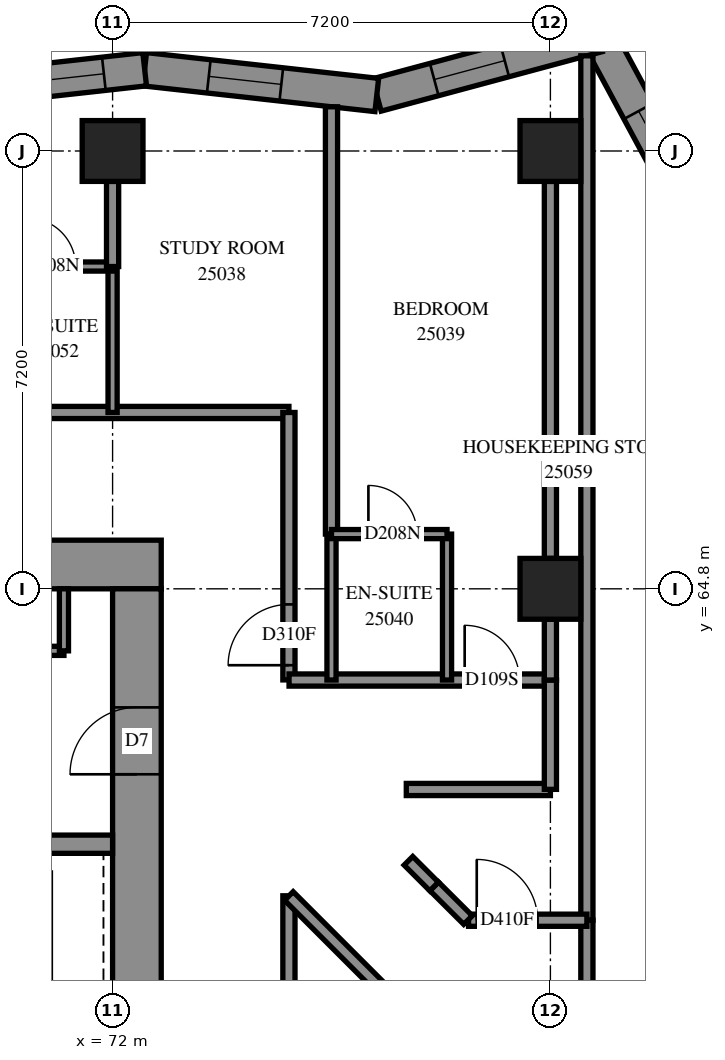
"""IFC4 building model, lengths in metres.
Left out: names, types, materials, properties, quantities, classifications, styles, units other than length and angle.
Written with IfcOpenShell. Run it as: python <this file> out.ifc"""

import sys

from ifc_helpers import new_model, si_unit, direction, frame, frame_2d, origin, origin_2d, place, context, subcontext, project, spatial, polyline, rectangle, outline, extrude, element, fill, save


model = new_model("IFC4")
c1 = context("Model", 3, precision=1e-05, world=origin(), true_north=direction((0.0, 1.0)))
c2 = subcontext(c1, "Body", "Model", "MODEL_VIEW")
j1 = project(units=[si_unit("LENGTHUNIT", "METRE"), si_unit("PLANEANGLEUNIT", "RADIAN")], contexts=[c1])
p1 = place(None, origin())
s1 = spatial("IfcSite", under=j1, at=p1, CompositionType="ELEMENT")
p2 = place(p1, origin())
s2 = spatial("IfcBuilding", under=s1, at=p2, CompositionType="ELEMENT")
p3 = place(p2, frame((0.0, 0.0, 94.8)))
s3 = spatial("IfcBuildingStorey", under=s2, at=p3, CompositionType="ELEMENT", Elevation=94.8)
for number, where, z_axis, x_axis in (
    (1, (72.0, 72.0, 0.0), (0.0, 0.0, 1.0), (1.0, 0.0, 0.0)),
    (2, (79.2, 64.8, 0.0), (0.0, 0.0, 1.0), (1.0, 0.0, 0.0)),
    (3, (79.2, 72.0, 0.0), (0.0, 0.0, 1.0), (1.0, 0.0, 0.0)),
):
    element("IfcColumn", number, at=place(p3, frame(where, z_axis=z_axis, x_axis=x_axis)), inside=s3, PredefinedType="COLUMN", context=c2, shape_type="SweptSolid", body=[
        extrude(rectangle(XDim=1.0, YDim=1.0, at=origin_2d()), origin(), (0.0, 0.0, 1.0), 3.1),
    ])
p4 = place(p3, frame((56.8, 65.2, -0.3), z_axis=(0.0, 0.0, 1.0), x_axis=(1.0, 0.0, 0.0)))
e4 = element("IfcWall", 4, at=p4, inside=s3, PredefinedType="SHEAR", context=c2, shape_type="SweptSolid", body=[
    extrude(rectangle(XDim=16.0, YDim=0.8, at=frame_2d((8.0, 0.0))), origin(), (0.0, 0.0, 1.0), 2.7),
])
p5 = place(p4, frame((10.8, 0.0, 0.3)))
e5 = element("IfcOpeningElement", 5, at=p5, cuts=e4, PredefinedType="OPENING", context=c2, shape_type="SweptSolid", body=[
    extrude(rectangle(XDim=0.8, YDim=2.1, at=frame_2d((0.4, 1.05))), frame((0.0, 0.41, 0.0), z_axis=(0.0, -1.0, 0.0), x_axis=(1.0, 0.0, 0.0)), (0.0, 0.0, 1.0), 0.82),
])
p6 = place(p3, frame((72.4, 50.4, -0.3), z_axis=(0.0, 0.0, 1.0), x_axis=(0.0, 1.0, 0.0)))
e6 = element("IfcWall", 6, at=p6, inside=s3, PredefinedType="SHEAR", context=c2, shape_type="SweptSolid", body=[
    extrude(rectangle(XDim=14.4, YDim=0.8, at=frame_2d((7.2, 0.0))), origin(), (0.0, 0.0, 1.0), 2.7),
])
p7 = place(p6, frame((4.55, 0.0, 0.3)))
e7 = element("IfcOpeningElement", 7, at=p7, cuts=e6, PredefinedType="OPENING", context=c2, shape_type="SweptSolid", body=[
    extrude(rectangle(XDim=1.1, YDim=2.1, at=frame_2d((0.55, 1.05))), frame((0.0, 0.41, 0.0), z_axis=(0.0, -1.0, 0.0), x_axis=(1.0, 0.0, 0.0)), (0.0, 0.0, 1.0), 0.82),
])
p8 = place(p6, frame((11.35, 0.0, 0.3)))
e8 = element("IfcOpeningElement", 8, at=p8, cuts=e6, PredefinedType="OPENING", context=c2, shape_type="SweptSolid", body=[
    extrude(rectangle(XDim=1.1, YDim=2.1, at=frame_2d((0.55, 1.05))), frame((0.0, 0.41, 0.0), z_axis=(0.0, -1.0, 0.0), x_axis=(1.0, 0.0, 0.0)), (0.0, 0.0, 1.0), 0.82),
])
p9 = place(p3, frame((64.8, 60.6, 0.0), z_axis=(0.0, 0.0, 1.0), x_axis=(1.0, 0.0, 0.0)))
e9 = element("IfcWall", 9, at=p9, inside=s3, PredefinedType="SOLIDWALL", context=c2, shape_type="SweptSolid", body=[
    extrude(rectangle(XDim=7.2, YDim=0.3, at=frame_2d((3.6, 0.0))), origin(), (0.0, 0.0, 1.0), 3.1),
])
p10 = place(p3, frame((76.372, 49.373, -0.3), z_axis=(0.0, 0.0, 1.0), x_axis=(0.7071067812, 0.7071067812, 0.0)))
e10 = element("IfcWall", 10, at=p10, inside=s3, PredefinedType="SHEAR", context=c2, shape_type="SweptSolid", body=[
    extrude(rectangle(XDim=14.4, YDim=0.8, at=frame_2d((7.2, 0.0))), origin(), (0.0, 0.0, 1.0), 2.7),
])
p11 = place(p10, frame((4.55, 0.0, 0.3)))
e11 = element("IfcOpeningElement", 11, at=p11, cuts=e10, PredefinedType="OPENING", context=c2, shape_type="SweptSolid", body=[
    extrude(rectangle(XDim=1.1, YDim=2.1, at=frame_2d((0.55, 1.05))), frame((0.0, 0.41, 0.0), z_axis=(0.0, -1.0, 0.0), x_axis=(1.0, 0.0, 0.0)), (0.0, 0.0, 1.0), 0.82),
])
p12 = place(p10, frame((11.35, 0.0, 0.3)))
e12 = element("IfcOpeningElement", 12, at=p12, cuts=e10, PredefinedType="OPENING", context=c2, shape_type="SweptSolid", body=[
    extrude(rectangle(XDim=1.1, YDim=2.1, at=frame_2d((0.55, 1.05))), frame((0.0, 0.41, 0.0), z_axis=(0.0, -1.0, 0.0), x_axis=(1.0, 0.0, 0.0)), (0.0, 0.0, 1.0), 0.82),
])
p13 = place(p3, frame((81.594, 70.907, 0.0), z_axis=(0.0, 0.0, 1.0), x_axis=(-0.4744753072, 0.8802688129, 0.0)))
e13 = element("IfcWall", 13, at=p13, inside=s3, PredefinedType="SOLIDWALL", context=c2, shape_type="SweptSolid", body=[
    extrude(outline(polyline([(0.058, -0.275), (3.616, -0.275), (3.181, 0.275), (-0.058, 0.275), (0.058, -0.275)])), origin(), (0.0, 0.0, 1.0), 3.1),
])
p14 = place(p13, frame((0.787, 0.0, 0.5)))
e14 = element("IfcOpeningElement", 14, at=p14, cuts=e13, PredefinedType="OPENING", context=c2, shape_type="SweptSolid", body=[
    extrude(rectangle(XDim=1.2, YDim=2.45, at=frame_2d((0.6, 1.225))), frame((0.0, 0.285, 0.0), z_axis=(0.0, -1.0, 0.0), x_axis=(1.0, 0.0, 0.0)), (0.0, 0.0, 1.0), 0.57),
])
p15 = place(p3, frame((79.981, 73.899, 0.0), z_axis=(0.0, 0.0, 1.0), x_axis=(-0.9656875188, -0.2597067886, 0.0)))
e15 = element("IfcWall", 15, at=p15, inside=s3, PredefinedType="SOLIDWALL", context=c2, shape_type="SweptSolid", body=[
    extrude(outline(polyline([(-0.218, -0.275), (3.713, -0.275), (3.817, 0.275), (0.218, 0.275), (-0.218, -0.275)])), origin(), (0.0, 0.0, 1.0), 3.1),
])
p16 = place(p15, frame((1.587, 0.0, 0.5)))
e16 = element("IfcOpeningElement", 16, at=p16, cuts=e15, PredefinedType="OPENING", context=c2, shape_type="SweptSolid", body=[
    extrude(rectangle(XDim=1.2, YDim=2.45, at=frame_2d((0.6, 1.225))), frame((0.0, 0.285, 0.0), z_axis=(0.0, -1.0, 0.0), x_axis=(1.0, 0.0, 0.0)), (0.0, 0.0, 1.0), 0.57),
])
p17 = place(p3, frame((76.345, 72.921, 0.0), z_axis=(0.0, 0.0, 1.0), x_axis=(-0.9939087915, 0.1102057815, 0.0)))
e17 = element("IfcWall", 17, at=p17, inside=s3, PredefinedType="SOLIDWALL", context=c2, shape_type="SweptSolid", body=[
    extrude(outline(polyline([(0.052, -0.275), (3.872, -0.275), (3.811, 0.275), (-0.052, 0.275), (0.052, -0.275)])), origin(), (0.0, 0.0, 1.0), 3.1),
])
p18 = place(p17, frame((1.58, 0.0, 0.5)))
e18 = element("IfcOpeningElement", 18, at=p18, cuts=e17, PredefinedType="OPENING", context=c2, shape_type="SweptSolid", body=[
    extrude(rectangle(XDim=1.2, YDim=2.45, at=frame_2d((0.6, 1.225))), frame((0.0, 0.285, 0.0), z_axis=(0.0, -1.0, 0.0), x_axis=(1.0, 0.0, 0.0)), (0.0, 0.0, 1.0), 0.57),
])
p19 = place(p3, frame((72.527, 73.344, 0.0), z_axis=(0.0, 0.0, 1.0), x_axis=(-0.99390702, -0.1102217568, 0.0)))
e19 = element("IfcWall", 19, at=p19, inside=s3, PredefinedType="SOLIDWALL", context=c2, shape_type="SweptSolid", body=[
    extrude(outline(polyline([(-0.03, -0.275), (3.789, -0.275), (3.85, 0.275), (0.03, 0.275), (-0.03, -0.275)])), origin(), (0.0, 0.0, 1.0), 3.1),
])
p20 = place(p19, frame((0.675, 0.0, 0.5)))
e20 = element("IfcOpeningElement", 20, at=p20, cuts=e19, PredefinedType="OPENING", context=c2, shape_type="SweptSolid", body=[
    extrude(rectangle(XDim=1.3, YDim=2.45, at=frame_2d((0.65, 1.225))), frame((0.0, 0.285, 0.0), z_axis=(0.0, -1.0, 0.0), x_axis=(1.0, 0.0, 0.0)), (0.0, 0.0, 1.0), 0.57),
])
p21 = place(p19, frame((2.175, 0.0, 0.5)))
e21 = element("IfcOpeningElement", 21, at=p21, cuts=e19, PredefinedType="OPENING", context=c2, shape_type="SweptSolid", body=[
    extrude(rectangle(XDim=1.3, YDim=2.45, at=frame_2d((0.65, 1.225))), frame((0.0, 0.285, 0.0), z_axis=(0.0, -1.0, 0.0), x_axis=(1.0, 0.0, 0.0)), (0.0, 0.0, 1.0), 0.57),
])
p22 = place(p3, frame((64.95, 63.78, 0.0), z_axis=(0.0, 0.0, 1.0), x_axis=(1.0, 0.0, 0.0)))
e22 = element("IfcWall", 22, at=p22, inside=s3, PredefinedType="PARTITIONING", context=c2, shape_type="SweptSolid", body=[
    extrude(rectangle(XDim=6.25, YDim=0.15, at=frame_2d((3.125, 0.0))), origin(), (0.0, 0.0, 1.0), 3.1),
])
p23 = place(p3, frame((71.2, 63.78, 0.0), z_axis=(0.0, 0.0, 1.0), x_axis=(0.0, 1.0, 0.0)))
e23 = element("IfcWall", 23, at=p23, inside=s3, PredefinedType="PARTITIONING", context=c2, shape_type="SweptSolid", body=[
    extrude(rectangle(XDim=1.02, YDim=0.15, at=frame_2d((0.51, 0.0))), origin(), (0.0, 0.0, 1.0), 3.1),
])
p24 = place(p3, frame((54.7, 67.7, 0.0), z_axis=(0.0, 0.0, 1.0), x_axis=(1.0, 0.0, 0.0)))
e24 = element("IfcWall", 24, at=p24, inside=s3, PredefinedType="PARTITIONING", context=c2, shape_type="SweptSolid", body=[
    extrude(rectangle(XDim=20.2, YDim=0.2, at=frame_2d((10.1, 0.0))), origin(), (0.0, 0.0, 1.0), 3.1),
])
p25 = place(p24, frame((5.25, 0.0, 0.0)))
e25 = element("IfcOpeningElement", 25, at=p25, cuts=e24, PredefinedType="OPENING", context=c2, shape_type="SweptSolid", body=[
    extrude(rectangle(XDim=0.9, YDim=2.1, at=frame_2d((0.45, 1.05))), frame((0.0, 0.11, 0.0), z_axis=(0.0, -1.0, 0.0), x_axis=(1.0, 0.0, 0.0)), (0.0, 0.0, 1.0), 0.22),
])
p26 = place(p24, frame((6.9, 0.0, 0.0)))
e26 = element("IfcOpeningElement", 26, at=p26, cuts=e24, PredefinedType="OPENING", context=c2, shape_type="SweptSolid", body=[
    extrude(rectangle(XDim=0.9, YDim=2.1, at=frame_2d((0.45, 1.05))), frame((0.0, 0.11, 0.0), z_axis=(0.0, -1.0, 0.0), x_axis=(1.0, 0.0, 0.0)), (0.0, 0.0, 1.0), 0.22),
])
p27 = place(p24, frame((12.45, 0.0, 0.0)))
e27 = element("IfcOpeningElement", 27, at=p27, cuts=e24, PredefinedType="OPENING", context=c2, shape_type="SweptSolid", body=[
    extrude(rectangle(XDim=0.9, YDim=2.1, at=frame_2d((0.45, 1.05))), frame((0.0, 0.11, 0.0), z_axis=(0.0, -1.0, 0.0), x_axis=(1.0, 0.0, 0.0)), (0.0, 0.0, 1.0), 0.22),
])
p28 = place(p24, frame((14.1, 0.0, 0.0)))
e28 = element("IfcOpeningElement", 28, at=p28, cuts=e24, PredefinedType="OPENING", context=c2, shape_type="SweptSolid", body=[
    extrude(rectangle(XDim=0.9, YDim=2.1, at=frame_2d((0.45, 1.05))), frame((0.0, 0.11, 0.0), z_axis=(0.0, -1.0, 0.0), x_axis=(1.0, 0.0, 0.0)), (0.0, 0.0, 1.0), 0.22),
])
p29 = place(p3, frame((79.8, 59.35, 0.0), z_axis=(0.0, 0.0, 1.0), x_axis=(0.0, 1.0, 0.0)))
e29 = element("IfcWall", 29, at=p29, inside=s3, PredefinedType="PARTITIONING", context=c2, shape_type="SweptSolid", body=[
    extrude(rectangle(XDim=14.215, YDim=0.2, at=frame_2d((7.108, 0.0))), origin(), (0.0, 0.0, 1.0), 3.1),
])
p30 = place(p3, frame((75.6, 65.7, 0.0), z_axis=(0.0, 0.0, 1.0), x_axis=(0.0, 1.0, 0.0)))
e30 = element("IfcWall", 30, at=p30, inside=s3, PredefinedType="PARTITIONING", context=c2, shape_type="SweptSolid", body=[
    extrude(rectangle(XDim=7.027, YDim=0.2, at=frame_2d((3.514, 0.0))), origin(), (0.0, 0.0, 1.0), 3.1),
])
p31 = place(p3, frame((79.2, 65.3, 0.0), z_axis=(0.0, 0.0, 1.0), x_axis=(0.0, 1.0, 0.0)))
e31 = element("IfcWall", 31, at=p31, inside=s3, PredefinedType="PARTITIONING", context=c2, shape_type="SweptSolid", body=[
    extrude(rectangle(XDim=6.2, YDim=0.2, at=frame_2d((3.1, 0.0))), origin(), (0.0, 0.0, 1.0), 3.1),
])
p32 = place(p3, frame((74.9, 53.7, 0.0), z_axis=(0.0, 0.0, 1.0), x_axis=(0.0, 1.0, 0.0)))
e32 = element("IfcWall", 32, at=p32, inside=s3, PredefinedType="PARTITIONING", context=c2, shape_type="SweptSolid", body=[
    extrude(rectangle(XDim=6.052, YDim=0.2, at=frame_2d((3.026, 0.0))), origin(), (0.0, 0.0, 1.0), 3.1),
])
p33 = place(p32, frame((0.142, 0.0, 0.0)))
e33 = element("IfcOpeningElement", 33, at=p33, cuts=e32, PredefinedType="OPENING", context=c2, shape_type="SweptSolid", body=[
    extrude(rectangle(XDim=1.0, YDim=2.1, at=frame_2d((0.5, 1.05))), frame((0.0, 0.11, 0.0), z_axis=(0.0, -1.0, 0.0), x_axis=(1.0, 0.0, 0.0)), (0.0, 0.0, 1.0), 0.22),
])
p34 = place(p3, frame((74.9, 63.302, 0.0), z_axis=(0.0, 0.0, 1.0), x_axis=(0.0, 1.0, 0.0)))
e34 = element("IfcWall", 34, at=p34, inside=s3, PredefinedType="PARTITIONING", context=c2, shape_type="SweptSolid", body=[
    extrude(rectangle(XDim=4.398, YDim=0.2, at=frame_2d((2.199, 0.0))), origin(), (0.0, 0.0, 1.0), 3.1),
])
p35 = place(p34, frame((0.242, 0.0, 0.0)))
e35 = element("IfcOpeningElement", 35, at=p35, cuts=e34, PredefinedType="OPENING", context=c2, shape_type="SweptSolid", body=[
    extrude(rectangle(XDim=1.0, YDim=2.1, at=frame_2d((0.5, 1.05))), frame((0.0, 0.11, 0.0), z_axis=(0.0, -1.0, 0.0), x_axis=(1.0, 0.0, 0.0)), (0.0, 0.0, 1.0), 0.22),
])
p36 = place(p3, frame((74.902, 63.3, 0.0), z_axis=(0.0, 0.0, 1.0), x_axis=(1.0, 0.0, 0.0)))
e36 = element("IfcWall", 36, at=p36, inside=s3, PredefinedType="PARTITIONING", context=c2, shape_type="SweptSolid", body=[
    extrude(rectangle(XDim=4.298, YDim=0.2, at=frame_2d((2.149, 0.0))), origin(), (0.0, 0.0, 1.0), 3.1),
])
p37 = place(p36, frame((2.888, 0.0, 0.0)))
e37 = element("IfcOpeningElement", 37, at=p37, cuts=e36, PredefinedType="OPENING", context=c2, shape_type="SweptSolid", body=[
    extrude(rectangle(XDim=0.9, YDim=2.1, at=frame_2d((0.45, 1.05))), frame((0.0, 0.11, 0.0), z_axis=(0.0, -1.0, 0.0), x_axis=(1.0, 0.0, 0.0)), (0.0, 0.0, 1.0), 0.22),
])
p38 = place(p3, frame((74.899, 59.749, 0.0), z_axis=(0.0, 0.0, 1.0), x_axis=(0.7071067812, -0.7071067812, 0.0)))
e38 = element("IfcWall", 38, at=p38, inside=s3, PredefinedType="PARTITIONING", context=c2, shape_type="SweptSolid", body=[
    extrude(rectangle(XDim=3.601, YDim=0.2, at=frame_2d((1.8, 0.0))), origin(), (0.0, 0.0, 1.0), 3.1),
])
p39 = place(p3, frame((79.8, 56.622, 0.0), z_axis=(0.0, 0.0, 1.0), x_axis=(0.0, 1.0, 0.0)))
e39 = element("IfcWall", 39, at=p39, inside=s3, PredefinedType="PARTITIONING", context=c2, shape_type="SweptSolid", body=[
    extrude(rectangle(XDim=2.728, YDim=0.2, at=frame_2d((1.364, 0.0))), origin(), (0.0, 0.0, 1.0), 3.1),
])
for number, where, z_axis, x_axis in (
    (40, (75.6, 63.3, 0.0), (0.0, 0.0, 1.0), (0.0, 1.0, 0.0)),
    (41, (77.5, 63.3, 0.0), (0.0, 0.0, 1.0), (0.0, 1.0, 0.0)),
    (42, (72.0, 67.7, 0.0), (0.0, 0.0, 1.0), (0.0, 1.0, 0.0)),
):
    element("IfcWall", number, at=place(p3, frame(where, z_axis=z_axis, x_axis=x_axis)), inside=s3, PredefinedType="PARTITIONING", context=c2, shape_type="SweptSolid", body=[
        extrude(rectangle(XDim=2.4, YDim=0.15, at=frame_2d((1.2, 0.0))), origin(), (0.0, 0.0, 1.0), 3.1),
    ])
p40 = place(p3, frame((76.83, 61.5, 0.0), z_axis=(0.0, 0.0, 1.0), x_axis=(1.0, 0.0, 0.0)))
e43 = element("IfcWall", 43, at=p40, inside=s3, PredefinedType="PARTITIONING", context=c2, shape_type="SweptSolid", body=[
    extrude(rectangle(XDim=2.37, YDim=0.2, at=frame_2d((1.185, 0.0))), origin(), (0.0, 0.0, 1.0), 3.1),
])
p41 = place(p3, frame((77.854, 59.35, 0.0), z_axis=(0.0, 0.0, 1.0), x_axis=(1.0, 0.0, 0.0)))
e44 = element("IfcWall", 44, at=p41, inside=s3, PredefinedType="PARTITIONING", context=c2, shape_type="SweptSolid", body=[
    extrude(rectangle(XDim=1.946, YDim=0.2, at=frame_2d((0.973, 0.0))), origin(), (0.0, 0.0, 1.0), 3.1),
])
p42 = place(p41, frame((0.135, 0.0, 0.0)))
e45 = element("IfcOpeningElement", 45, at=p42, cuts=e44, PredefinedType="OPENING", context=c2, shape_type="SweptSolid", body=[
    extrude(rectangle(XDim=1.0, YDim=2.1, at=frame_2d((0.5, 1.05))), frame((0.0, 0.11, 0.0), z_axis=(0.0, -1.0, 0.0), x_axis=(1.0, 0.0, 0.0)), (0.0, 0.0, 1.0), 0.22),
])
p43 = place(p3, frame((75.6, 65.7, 0.0), z_axis=(0.0, 0.0, 1.0), x_axis=(1.0, 0.0, 0.0)))
e46 = element("IfcWall", 46, at=p43, inside=s3, PredefinedType="PARTITIONING", context=c2, shape_type="SweptSolid", body=[
    extrude(rectangle(XDim=1.9, YDim=0.15, at=frame_2d((0.95, 0.0))), origin(), (0.0, 0.0, 1.0), 3.1),
])
p44 = place(p43, frame((0.607, 0.0, 0.0)))
e47 = element("IfcOpeningElement", 47, at=p44, cuts=e46, PredefinedType="OPENING", context=c2, shape_type="SweptSolid", body=[
    extrude(rectangle(XDim=0.8, YDim=2.1, at=frame_2d((0.4, 1.05))), frame((0.0, 0.085, 0.0), z_axis=(0.0, -1.0, 0.0), x_axis=(1.0, 0.0, 0.0)), (0.0, 0.0, 1.0), 0.17),
])
p45 = place(p3, frame((70.1, 70.1, 0.0), z_axis=(0.0, 0.0, 1.0), x_axis=(1.0, 0.0, 0.0)))
e48 = element("IfcWall", 48, at=p45, inside=s3, PredefinedType="PARTITIONING", context=c2, shape_type="SweptSolid", body=[
    extrude(rectangle(XDim=1.9, YDim=0.15, at=frame_2d((0.95, 0.0))), origin(), (0.0, 0.0, 1.0), 3.1),
])
p46 = place(p45, frame((0.493, 0.0, 0.0)))
e49 = element("IfcOpeningElement", 49, at=p46, cuts=e48, PredefinedType="OPENING", context=c2, shape_type="SweptSolid", body=[
    extrude(rectangle(XDim=0.8, YDim=2.1, at=frame_2d((0.4, 1.05))), frame((0.0, 0.085, 0.0), z_axis=(0.0, -1.0, 0.0), x_axis=(1.0, 0.0, 0.0)), (0.0, 0.0, 1.0), 0.17),
])
p47 = place(p3, frame((79.2, 61.502, 0.0), z_axis=(0.0, 0.0, 1.0), x_axis=(0.0, 1.0, 0.0)))
e50 = element("IfcWall", 50, at=p47, inside=s3, PredefinedType="PARTITIONING", context=c2, shape_type="SweptSolid", body=[
    extrude(rectangle(XDim=1.798, YDim=0.2, at=frame_2d((0.899, 0.0))), origin(), (0.0, 0.0, 1.0), 3.1),
])
p48 = place(p3, frame((72.0, 70.1, 0.0), z_axis=(0.0, 0.0, 1.0), x_axis=(0.0, 1.0, 0.0)))
e51 = element("IfcWall", 51, at=p48, inside=s3, PredefinedType="PARTITIONING", context=c2, shape_type="SweptSolid", body=[
    extrude(rectangle(XDim=1.4, YDim=0.2, at=frame_2d((0.7, 0.0))), origin(), (0.0, 0.0, 1.0), 3.1),
])
p49 = place(p3, frame((79.2, 63.3, 0.0), z_axis=(0.0, 0.0, 1.0), x_axis=(0.0, 1.0, 0.0)))
e52 = element("IfcWall", 52, at=p49, inside=s3, PredefinedType="PARTITIONING", context=c2, shape_type="SweptSolid", body=[
    extrude(rectangle(XDim=1.0, YDim=0.2, at=frame_2d((0.5, 0.0))), origin(), (0.0, 0.0, 1.0), 3.1),
])
p50 = place(p3, frame((77.289, 59.907, 0.0), z_axis=(0.0, 0.0, 1.0), x_axis=(0.7083796976, -0.7058315692, 0.0)))
e53 = element("IfcWall", 53, at=p50, inside=s3, PredefinedType="PARTITIONING", context=c2, shape_type="SweptSolid", body=[
    extrude(rectangle(XDim=0.785, YDim=0.2, at=frame_2d((0.393, 0.0))), origin(), (0.0, 0.0, 1.0), 3.1),
])
p51 = place(p3, frame((76.865, 60.327, 0.0), z_axis=(0.0, 0.0, 1.0), x_axis=(0.7071067812, -0.7071067812, 0.0)))
e54 = element("IfcWall", 54, at=p51, inside=s3, PredefinedType="PARTITIONING", context=c2, shape_type="SweptSolid", body=[
    extrude(rectangle(XDim=0.597, YDim=0.2, at=frame_2d((0.298, 0.0))), origin(), (0.0, 0.0, 1.0), 3.1),
])
p52 = place(p14, origin())
e55 = element("IfcWindow", 55, at=p52, inside=s3, PartitioningType="SINGLE_PANEL", PredefinedType="WINDOW", context=c2, shape_type="SweptSolid", body=[
    extrude(rectangle(XDim=1.2, YDim=2.45, at=frame_2d((0.6, 1.225))), frame((0.0, 0.155, 0.0), z_axis=(0.0, -1.0, 0.0), x_axis=(1.0, 0.0, 0.0)), (0.0, 0.0, 1.0), 0.06),
])
fill(e14, e55)
p53 = place(p16, origin())
e56 = element("IfcWindow", 56, at=p53, inside=s3, PartitioningType="SINGLE_PANEL", PredefinedType="WINDOW", context=c2, shape_type="SweptSolid", body=[
    extrude(rectangle(XDim=1.2, YDim=2.45, at=frame_2d((0.6, 1.225))), frame((0.0, 0.155, 0.0), z_axis=(0.0, -1.0, 0.0), x_axis=(1.0, 0.0, 0.0)), (0.0, 0.0, 1.0), 0.06),
])
fill(e16, e56)
p54 = place(p18, origin())
e57 = element("IfcWindow", 57, at=p54, inside=s3, PartitioningType="SINGLE_PANEL", PredefinedType="WINDOW", context=c2, shape_type="SweptSolid", body=[
    extrude(rectangle(XDim=1.2, YDim=2.45, at=frame_2d((0.6, 1.225))), frame((0.0, 0.155, 0.0), z_axis=(0.0, -1.0, 0.0), x_axis=(1.0, 0.0, 0.0)), (0.0, 0.0, 1.0), 0.06),
])
fill(e18, e57)
p55 = place(p20, origin())
e58 = element("IfcWindow", 58, at=p55, inside=s3, PartitioningType="SINGLE_PANEL", PredefinedType="WINDOW", context=c2, shape_type="SweptSolid", body=[
    extrude(rectangle(XDim=1.3, YDim=2.45, at=frame_2d((0.65, 1.225))), frame((0.0, 0.155, 0.0), z_axis=(0.0, -1.0, 0.0), x_axis=(1.0, 0.0, 0.0)), (0.0, 0.0, 1.0), 0.06),
])
fill(e20, e58)
p56 = place(p8, origin())
e59 = element("IfcDoor", 59, at=p56, inside=s3, OperationType="SINGLE_SWING_RIGHT", PredefinedType="DOOR", context=c2, shape_type="SweptSolid", body=[
    extrude(rectangle(XDim=1.1, YDim=2.1, at=frame_2d((0.55, 1.05))), frame((0.0, 0.025, 0.0), z_axis=(0.0, -1.0, 0.0), x_axis=(1.0, 0.0, 0.0)), (0.0, 0.0, 1.0), 0.05),
])
fill(e8, e59)
p57 = place(p35, origin())
e60 = element("IfcDoor", 60, at=p57, inside=s3, OperationType="SINGLE_SWING_RIGHT", PredefinedType="DOOR", context=c2, shape_type="SweptSolid", body=[
    extrude(rectangle(XDim=1.0, YDim=2.1, at=frame_2d((0.5, 1.05))), frame((0.0, 0.025, 0.0), z_axis=(0.0, -1.0, 0.0), x_axis=(1.0, 0.0, 0.0)), (0.0, 0.0, 1.0), 0.05),
])
fill(e35, e60)
p58 = place(p37, origin())
e61 = element("IfcDoor", 61, at=p58, inside=s3, OperationType="SINGLE_SWING_LEFT", PredefinedType="DOOR", context=c2, shape_type="SweptSolid", body=[
    extrude(rectangle(XDim=0.9, YDim=2.1, at=frame_2d((0.45, 1.05))), frame((0.0, 0.025, 0.0), z_axis=(0.0, -1.0, 0.0), x_axis=(1.0, 0.0, 0.0)), (0.0, 0.0, 1.0), 0.05),
])
fill(e37, e61)
p59 = place(p44, origin())
e62 = element("IfcDoor", 62, at=p59, inside=s3, OperationType="SINGLE_SWING_RIGHT", PredefinedType="DOOR", context=c2, shape_type="SweptSolid", body=[
    extrude(rectangle(XDim=0.8, YDim=2.1, at=frame_2d((0.4, 1.05))), frame((0.0, 0.025, 0.0), z_axis=(0.0, -1.0, 0.0), x_axis=(1.0, 0.0, 0.0)), (0.0, 0.0, 1.0), 0.05),
])
fill(e47, e62)
p60 = place(p46, origin())
e63 = element("IfcDoor", 63, at=p60, inside=s3, OperationType="SINGLE_SWING_RIGHT", PredefinedType="DOOR", context=c2, shape_type="SweptSolid", body=[
    extrude(rectangle(XDim=0.8, YDim=2.1, at=frame_2d((0.4, 1.05))), frame((0.0, 0.025, 0.0), z_axis=(0.0, -1.0, 0.0), x_axis=(1.0, 0.0, 0.0)), (0.0, 0.0, 1.0), 0.05),
])
fill(e49, e63)
p61 = place(p42, origin())
e64 = element("IfcDoor", 64, at=p61, inside=s3, OperationType="SINGLE_SWING_LEFT", PredefinedType="DOOR", context=c2, shape_type="SweptSolid", body=[
    extrude(rectangle(XDim=1.0, YDim=2.1, at=frame_2d((0.5, 1.05))), frame((0.0, 0.025, 0.0), z_axis=(0.0, -1.0, 0.0), x_axis=(1.0, 0.0, 0.0)), (0.0, 0.0, 1.0), 0.05),
])
fill(e45, e64)
save(model, sys.argv[1])
